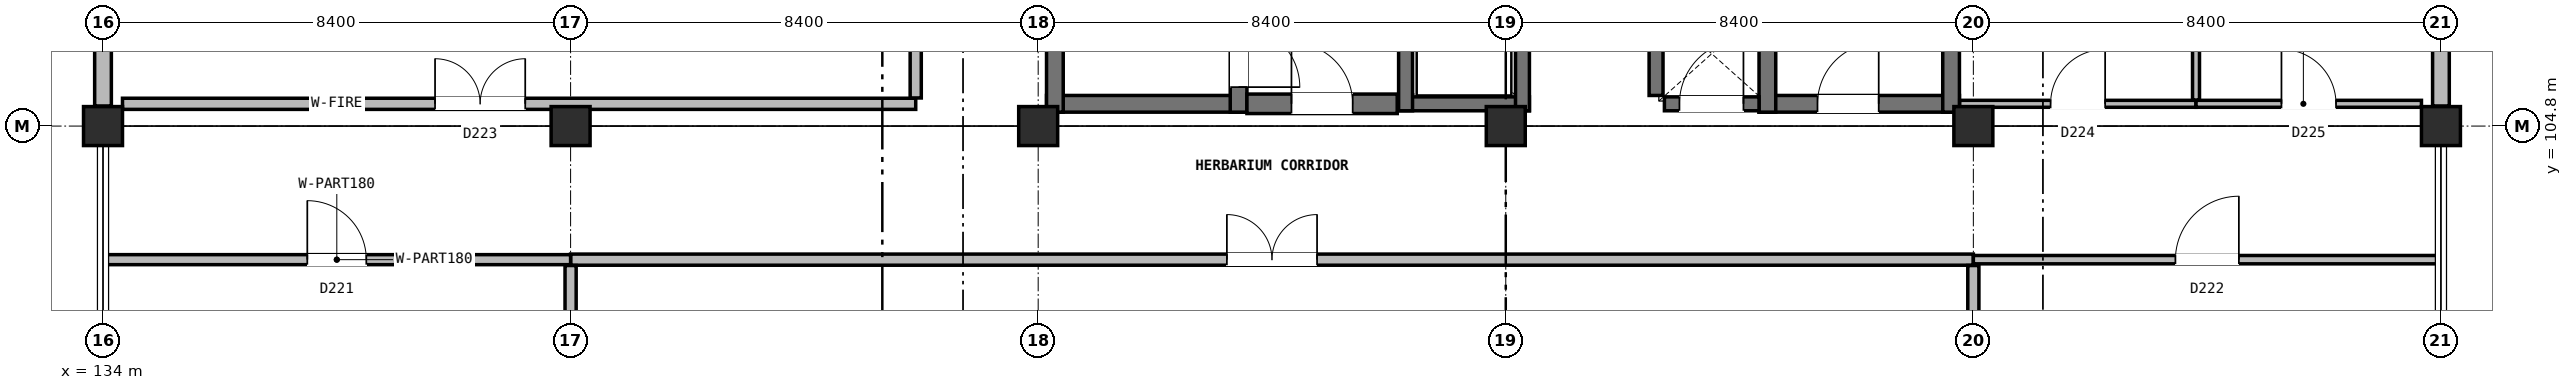
"""IFC4 building model, lengths in metres.
Left out: names, types, materials, properties, quantities, classifications, styles, units other than length and angle.
Written with IfcOpenShell. Run it as: python <this file> out.ifc"""

import sys

from ifc_helpers import new_model, si_unit, direction, frame, frame_2d, origin, origin_2d, place, context, subcontext, project, spatial, rectangle, extrude, element, fill, save


model = new_model("IFC4")
c1 = context("Model", 3, precision=1e-05, world=origin(), true_north=direction((0.0, 1.0)))
c2 = subcontext(c1, "Body", "Model", "MODEL_VIEW")
j1 = project(units=[si_unit("LENGTHUNIT", "METRE"), si_unit("PLANEANGLEUNIT", "RADIAN")], contexts=[c1])
p1 = place(None, origin())
s1 = spatial("IfcSite", under=j1, at=p1, CompositionType="ELEMENT")
p2 = place(p1, origin())
s2 = spatial("IfcBuilding", under=s1, at=p2, CompositionType="ELEMENT")
p3 = place(p2, frame((0.0, 0.0, 28.8)))
s3 = spatial("IfcBuildingStorey", under=s2, at=p3, CompositionType="ELEMENT", Elevation=28.8)
for number, where, z_axis, x_axis in (
    (1, (134.0, 104.8, 0.0), (0.0, 0.0, 1.0), (1.0, 0.0, 0.0)),
    (2, (142.4, 104.8, 0.0), (0.0, 0.0, 1.0), (1.0, 0.0, 0.0)),
    (3, (150.8, 104.8, 0.0), (0.0, 0.0, 1.0), (1.0, 0.0, 0.0)),
    (4, (159.2, 104.8, 0.0), (0.0, 0.0, 1.0), (1.0, 0.0, 0.0)),
    (5, (167.6, 104.8, 0.0), (0.0, 0.0, 1.0), (1.0, 0.0, 0.0)),
    (6, (176.0, 104.8, 0.0), (0.0, 0.0, 1.0), (1.0, 0.0, 0.0)),
):
    element("IfcColumn", number, at=place(p3, frame(where, z_axis=z_axis, x_axis=x_axis)), inside=s3, PredefinedType="COLUMN", context=c2, shape_type="SweptSolid", body=[
        extrude(rectangle(XDim=0.7, YDim=0.7, at=origin_2d()), origin(), (0.0, 0.0, 1.0), 4.0),
    ])
p4 = place(p3, frame((176.0, 105.16, 0.0), z_axis=(0.0, 0.0, 1.0), x_axis=(0.0, 1.0, 0.0)))
e7 = element("IfcWall", 7, at=p4, inside=s3, PredefinedType="SOLIDWALL", context=c2, shape_type="SweptSolid", body=[
    extrude(rectangle(XDim=8.08, YDim=0.3, at=frame_2d((4.04, 0.0))), origin(), (0.0, 0.0, 1.0), 3.15),
])
p5 = place(p4, frame((2.46, 0.0, 0.9)))
e8 = element("IfcOpeningElement", 8, at=p5, cuts=e7, PredefinedType="OPENING", context=c2, shape_type="SweptSolid", body=[
    extrude(rectangle(XDim=3.2, YDim=2.1, at=frame_2d((1.6, 1.05))), frame((0.0, 0.16, 0.0), z_axis=(0.0, -1.0, 0.0), x_axis=(1.0, 0.0, 0.0)), (0.0, 0.0, 1.0), 0.32),
])
p6 = place(p3, frame((134.0, 113.24, 0.0), z_axis=(0.0, 0.0, 1.0), x_axis=(0.0, -1.0, 0.0)))
e9 = element("IfcWall", 9, at=p6, inside=s3, PredefinedType="SOLIDWALL", context=c2, shape_type="SweptSolid", body=[
    extrude(rectangle(XDim=8.08, YDim=0.3, at=frame_2d((4.04, 0.0))), origin(), (0.0, 0.0, 1.0), 3.15),
])
p7 = place(p6, frame((3.27, 0.0, 0.9)))
e10 = element("IfcOpeningElement", 10, at=p7, cuts=e9, PredefinedType="OPENING", context=c2, shape_type="SweptSolid", body=[
    extrude(rectangle(XDim=1.5, YDim=1.8, at=frame_2d((0.75, 0.9))), frame((0.0, 0.16, 0.0), z_axis=(0.0, -1.0, 0.0), x_axis=(1.0, 0.0, 0.0)), (0.0, 0.0, 1.0), 0.32),
])
p8 = place(p3, frame((150.95, 105.2, 0.0), z_axis=(0.0, 0.0, 1.0), x_axis=(1.0, 0.0, 0.0)))
e11 = element("IfcWall", 11, at=p8, inside=s3, PredefinedType="SHEAR", context=c2, shape_type="SweptSolid", body=[
    extrude(rectangle(XDim=3.6, YDim=0.3, at=frame_2d((1.8, 0.0))), origin(), (0.0, 0.0, 1.0), 4.0),
])
p9 = place(p3, frame((151.1, 105.05, 0.0), z_axis=(0.0, 0.0, 1.0), x_axis=(0.0, 1.0, 0.0)))
e12 = element("IfcWall", 12, at=p9, inside=s3, PredefinedType="SHEAR", context=c2, shape_type="SweptSolid", body=[
    extrude(rectangle(XDim=8.3, YDim=0.3, at=frame_2d((4.15, 0.0))), origin(), (0.0, 0.0, 1.0), 4.0),
])
p10 = place(p3, frame((154.4, 105.05, 0.0), z_axis=(0.0, 0.0, 1.0), x_axis=(0.0, 1.0, 0.0)))
e13 = element("IfcWall", 13, at=p10, inside=s3, PredefinedType="SHEAR", context=c2, shape_type="SweptSolid", body=[
    extrude(rectangle(XDim=8.3, YDim=0.3, at=frame_2d((4.15, 0.0))), origin(), (0.0, 0.0, 1.0), 4.0),
])
p11 = place(p10, frame((0.45, 0.0, 0.0)))
e14 = element("IfcOpeningElement", 14, at=p11, cuts=e13, PredefinedType="OPENING", context=c2, shape_type="SweptSolid", body=[
    extrude(rectangle(XDim=1.1, YDim=2.2, at=frame_2d((0.55, 1.1))), frame((0.0, 0.16, 0.0), z_axis=(0.0, -1.0, 0.0), x_axis=(1.0, 0.0, 0.0)), (0.0, 0.0, 1.0), 0.32),
])
p12 = place(p3, frame((163.75, 105.2, 0.0), z_axis=(0.0, 0.0, 1.0), x_axis=(1.0, 0.0, 0.0)))
e15 = element("IfcWall", 15, at=p12, inside=s3, PredefinedType="SHEAR", context=c2, shape_type="SweptSolid", body=[
    extrude(rectangle(XDim=3.6, YDim=0.3, at=frame_2d((1.8, 0.0))), origin(), (0.0, 0.0, 1.0), 4.0),
])
p13 = place(p12, frame((1.05, 0.0, 0.0)))
e16 = element("IfcOpeningElement", 16, at=p13, cuts=e15, PredefinedType="OPENING", context=c2, shape_type="SweptSolid", body=[
    extrude(rectangle(XDim=1.1, YDim=2.2, at=frame_2d((0.55, 1.1))), frame((0.0, 0.16, 0.0), z_axis=(0.0, -1.0, 0.0), x_axis=(1.0, 0.0, 0.0)), (0.0, 0.0, 1.0), 0.32),
])
for number, where, z_axis, x_axis in (
    (17, (163.9, 105.05, 0.0), (0.0, 0.0, 1.0), (0.0, 1.0, 0.0)),
    (18, (167.2, 105.05, 0.0), (0.0, 0.0, 1.0), (0.0, 1.0, 0.0)),
):
    element("IfcWall", number, at=place(p3, frame(where, z_axis=z_axis, x_axis=x_axis)), inside=s3, PredefinedType="SHEAR", context=c2, shape_type="SweptSolid", body=[
        extrude(rectangle(XDim=8.3, YDim=0.3, at=frame_2d((4.15, 0.0))), origin(), (0.0, 0.0, 1.0), 4.0),
    ])
p14 = place(p3, frame((157.275, 105.2, 0.0), z_axis=(0.0, 0.0, 1.0), x_axis=(1.0, 0.0, 0.0)))
e19 = element("IfcWall", 19, at=p14, inside=s3, PredefinedType="SOLIDWALL", context=c2, shape_type="SweptSolid", body=[
    extrude(rectangle(XDim=2.35, YDim=0.25, at=frame_2d((1.175, 0.0))), origin(), (0.0, 0.0, 1.0), 3.68),
])
for number, where, z_axis, x_axis in (
    (20, (157.4, 105.075, 0.0), (0.0, 0.0, 1.0), (0.0, 1.0, 0.0)),
    (21, (159.5, 105.075, 0.0), (0.0, 0.0, 1.0), (0.0, 1.0, 0.0)),
):
    element("IfcWall", number, at=place(p3, frame(where, z_axis=z_axis, x_axis=x_axis)), inside=s3, PredefinedType="SOLIDWALL", context=c2, shape_type="SweptSolid", body=[
        extrude(rectangle(XDim=2.65, YDim=0.25, at=frame_2d((1.325, 0.0))), origin(), (0.0, 0.0, 1.0), 3.68),
    ])
p15 = place(p3, frame((154.55, 105.2, 0.0), z_axis=(0.0, 0.0, 1.0), x_axis=(1.0, 0.0, 0.0)))
e22 = element("IfcWall", 22, at=p15, inside=s3, PredefinedType="SHEAR", context=c2, shape_type="SweptSolid", body=[
    extrude(rectangle(XDim=2.7, YDim=0.35, at=frame_2d((1.35, 0.0))), origin(), (0.0, 0.0, 1.0), 3.68),
])
p16 = place(p15, frame((0.8, 0.0, 0.0)))
e23 = element("IfcOpeningElement", 23, at=p16, cuts=e22, PredefinedType="OPENING", context=c2, shape_type="SweptSolid", body=[
    extrude(rectangle(XDim=1.1, YDim=2.2, at=frame_2d((0.55, 1.1))), frame((0.0, 0.185, 0.0), z_axis=(0.0, -1.0, 0.0), x_axis=(1.0, 0.0, 0.0)), (0.0, 0.0, 1.0), 0.37),
])
p17 = place(p3, frame((161.9, 105.35, 0.0), z_axis=(0.0, 0.0, 1.0), x_axis=(0.0, 1.0, 0.0)))
e24 = element("IfcWall", 24, at=p17, inside=s3, PredefinedType="SOLIDWALL", context=c2, shape_type="SweptSolid", body=[
    extrude(rectangle(XDim=1.5, YDim=0.25, at=frame_2d((0.75, 0.0))), origin(), (0.0, 0.0, 1.0), 3.68),
])
p18 = place(p3, frame((162.05, 105.2, 0.0), z_axis=(0.0, 0.0, 1.0), x_axis=(1.0, 0.0, 0.0)))
e25 = element("IfcWall", 25, at=p18, inside=s3, PredefinedType="SOLIDWALL", context=c2, shape_type="SweptSolid", body=[
    extrude(rectangle(XDim=1.7, YDim=0.25, at=frame_2d((0.85, 0.0))), origin(), (0.0, 0.0, 1.0), 3.68),
])
p19 = place(p18, frame((0.27, 0.0, 0.0)))
e26 = element("IfcOpeningElement", 26, at=p19, cuts=e25, PredefinedType="OPENING", context=c2, shape_type="SweptSolid", body=[
    extrude(rectangle(XDim=1.15, YDim=2.2, at=frame_2d((0.575, 1.1))), frame((0.0, 0.135, 0.0), z_axis=(0.0, -1.0, 0.0), x_axis=(1.0, 0.0, 0.0)), (0.0, 0.0, 1.0), 0.27),
])
p20 = place(p3, frame((142.4, 102.4, 0.0), z_axis=(0.0, 0.0, 1.0), x_axis=(1.0, 0.0, 0.0)))
e27 = element("IfcWall", 27, at=p20, inside=s3, PredefinedType="PARTITIONING", context=c2, shape_type="SweptSolid", body=[
    extrude(rectangle(XDim=25.2, YDim=0.2, at=frame_2d((12.6, 0.0))), origin(), (0.0, 0.0, 1.0), 3.665),
])
p21 = place(p20, frame((11.79, 0.0, 0.0)))
e28 = element("IfcOpeningElement", 28, at=p21, cuts=e27, PredefinedType="OPENING", context=c2, shape_type="SweptSolid", body=[
    extrude(rectangle(XDim=1.62, YDim=2.25, at=frame_2d((0.81, 1.125))), frame((0.0, 0.11, 0.0), z_axis=(0.0, -1.0, 0.0), x_axis=(1.0, 0.0, 0.0)), (0.0, 0.0, 1.0), 0.22),
])
p22 = place(p3, frame((134.0, 102.4, 0.0), z_axis=(0.0, 0.0, 1.0), x_axis=(1.0, 0.0, 0.0)))
e29 = element("IfcWall", 29, at=p22, inside=s3, PredefinedType="PARTITIONING", context=c2, shape_type="SweptSolid", body=[
    extrude(rectangle(XDim=8.4, YDim=0.18, at=frame_2d((4.2, 0.0))), origin(), (0.0, 0.0, 1.0), 3.665),
])
p23 = place(p22, frame((3.67, 0.0, 0.0)))
e30 = element("IfcOpeningElement", 30, at=p23, cuts=e29, PredefinedType="OPENING", context=c2, shape_type="SweptSolid", body=[
    extrude(rectangle(XDim=1.06, YDim=2.22, at=frame_2d((0.53, 1.11))), frame((0.0, 0.1, 0.0), z_axis=(0.0, -1.0, 0.0), x_axis=(1.0, 0.0, 0.0)), (0.0, 0.0, 1.0), 0.2),
])
p24 = place(p3, frame((167.6, 102.4, 0.0), z_axis=(0.0, 0.0, 1.0), x_axis=(1.0, 0.0, 0.0)))
e31 = element("IfcWall", 31, at=p24, inside=s3, PredefinedType="PARTITIONING", context=c2, shape_type="SweptSolid", body=[
    extrude(rectangle(XDim=8.4, YDim=0.15, at=frame_2d((4.2, 0.0))), origin(), (0.0, 0.0, 1.0), 3.665),
])
p25 = place(p24, frame((3.63, 0.0, 0.0)))
e32 = element("IfcOpeningElement", 32, at=p25, cuts=e31, PredefinedType="OPENING", context=c2, shape_type="SweptSolid", body=[
    extrude(rectangle(XDim=1.14, YDim=2.24, at=frame_2d((0.57, 1.12))), frame((0.0, 0.085, 0.0), z_axis=(0.0, -1.0, 0.0), x_axis=(1.0, 0.0, 0.0)), (0.0, 0.0, 1.0), 0.17),
])
p26 = place(p3, frame((134.35, 105.2, 0.0), z_axis=(0.0, 0.0, 1.0), x_axis=(1.0, 0.0, 0.0)))
e33 = element("IfcWall", 33, at=p26, inside=s3, PredefinedType="PARTITIONING", context=c2, shape_type="SweptSolid", body=[
    extrude(rectangle(XDim=14.25, YDim=0.2, at=frame_2d((7.125, 0.0))), origin(), (0.0, 0.0, 1.0), 3.145),
])
p27 = place(p26, frame((5.615, 0.0, 0.0)))
e34 = element("IfcOpeningElement", 34, at=p27, cuts=e33, PredefinedType="OPENING", context=c2, shape_type="SweptSolid", body=[
    extrude(rectangle(XDim=1.62, YDim=2.25, at=frame_2d((0.81, 1.125))), frame((0.0, 0.11, 0.0), z_axis=(0.0, -1.0, 0.0), x_axis=(1.0, 0.0, 0.0)), (0.0, 0.0, 1.0), 0.22),
])
p28 = place(p3, frame((167.355, 105.2, 0.0), z_axis=(0.0, 0.0, 1.0), x_axis=(1.0, 0.0, 0.0)))
e35 = element("IfcWall", 35, at=p28, inside=s3, PredefinedType="PARTITIONING", context=c2, shape_type="SweptSolid", body=[
    extrude(rectangle(XDim=4.245, YDim=0.125, at=frame_2d((2.123, 0.0))), origin(), (0.0, 0.0, 1.0), 3.145),
])
p29 = place(p28, frame((1.633, 0.0, 0.0)))
e36 = element("IfcOpeningElement", 36, at=p29, cuts=e35, PredefinedType="OPENING", context=c2, shape_type="SweptSolid", body=[
    extrude(rectangle(XDim=0.98, YDim=2.1, at=frame_2d((0.49, 1.05))), frame((0.0, 0.073, 0.0), z_axis=(0.0, -1.0, 0.0), x_axis=(1.0, 0.0, 0.0)), (0.0, 0.0, 1.0), 0.145),
])
p30 = place(p3, frame((171.6, 105.2, 0.0), z_axis=(0.0, 0.0, 1.0), x_axis=(1.0, 0.0, 0.0)))
e37 = element("IfcWall", 37, at=p30, inside=s3, PredefinedType="PARTITIONING", context=c2, shape_type="SweptSolid", body=[
    extrude(rectangle(XDim=4.05, YDim=0.125, at=frame_2d((2.025, 0.0))), origin(), (0.0, 0.0, 1.0), 3.145),
])
p31 = place(p30, frame((1.535, 0.0, 0.0)))
e38 = element("IfcOpeningElement", 38, at=p31, cuts=e37, PredefinedType="OPENING", context=c2, shape_type="SweptSolid", body=[
    extrude(rectangle(XDim=0.98, YDim=2.1, at=frame_2d((0.49, 1.05))), frame((0.0, 0.073, 0.0), z_axis=(0.0, -1.0, 0.0), x_axis=(1.0, 0.0, 0.0)), (0.0, 0.0, 1.0), 0.145),
])
p32 = place(p3, frame((148.6, 105.305, 0.0), z_axis=(0.0, 0.0, 1.0), x_axis=(0.0, 1.0, 0.0)))
e39 = element("IfcWall", 39, at=p32, inside=s3, PredefinedType="PARTITIONING", context=c2, shape_type="SweptSolid", body=[
    extrude(rectangle(XDim=14.095, YDim=0.2, at=frame_2d((7.047, 0.0))), origin(), (0.0, 0.0, 1.0), 3.665),
])
for number, where, z_axis, x_axis in (
    (40, (142.4, 87.55, 0.0), (0.0, 0.0, 1.0), (0.0, 1.0, 0.0)),
    (41, (167.6, 87.55, 0.0), (0.0, 0.0, 1.0), (0.0, 1.0, 0.0)),
):
    element("IfcWall", number, at=place(p3, frame(where, z_axis=z_axis, x_axis=x_axis)), inside=s3, PredefinedType="PARTITIONING", context=c2, shape_type="SweptSolid", body=[
        extrude(rectangle(XDim=14.745, YDim=0.2, at=frame_2d((7.373, 0.0))), origin(), (0.0, 0.0, 1.0), 3.145),
    ])
p33 = place(p3, frame((171.6, 105.268, 0.0), z_axis=(0.0, 0.0, 1.0), x_axis=(0.0, 1.0, 0.0)))
e42 = element("IfcWall", 42, at=p33, inside=s3, PredefinedType="PARTITIONING", context=c2, shape_type="SweptSolid", body=[
    extrude(rectangle(XDim=16.978, YDim=0.125, at=frame_2d((8.489, 0.0))), origin(), (0.0, 0.0, 1.0), 3.665),
])
p34 = place(p11, frame((1.1, 0.0, 0.0), z_axis=(0.0, 0.0, 1.0), x_axis=(-1.0, 0.0, 0.0)))
e43 = element("IfcDoor", 43, at=p34, inside=s3, OperationType="SINGLE_SWING_LEFT", PredefinedType="DOOR", context=c2, shape_type="SweptSolid", body=[
    extrude(rectangle(XDim=1.1, YDim=2.2, at=frame_2d((0.55, 1.1))), frame((0.0, 0.025, 0.0), z_axis=(0.0, -1.0, 0.0), x_axis=(1.0, 0.0, 0.0)), (0.0, 0.0, 1.0), 0.05),
])
fill(e14, e43)
p35 = place(p13, origin())
e44 = element("IfcDoor", 44, at=p35, inside=s3, OperationType="SINGLE_SWING_RIGHT", PredefinedType="DOOR", context=c2, shape_type="SweptSolid", body=[
    extrude(rectangle(XDim=1.1, YDim=2.2, at=frame_2d((0.55, 1.1))), frame((0.0, 0.025, 0.0), z_axis=(0.0, -1.0, 0.0), x_axis=(1.0, 0.0, 0.0)), (0.0, 0.0, 1.0), 0.05),
])
fill(e16, e44)
p36 = place(p16, origin())
e45 = element("IfcDoor", 45, at=p36, inside=s3, OperationType="SINGLE_SWING_LEFT", PredefinedType="DOOR", context=c2, shape_type="SweptSolid", body=[
    extrude(rectangle(XDim=1.1, YDim=2.2, at=frame_2d((0.55, 1.1))), frame((0.0, 0.025, 0.0), z_axis=(0.0, -1.0, 0.0), x_axis=(1.0, 0.0, 0.0)), (0.0, 0.0, 1.0), 0.05),
])
fill(e23, e45)
p37 = place(p19, origin())
e46 = element("IfcDoor", 46, at=p37, inside=s3, OperationType="SINGLE_SWING_RIGHT", PredefinedType="DOOR", context=c2, shape_type="SweptSolid", body=[
    extrude(rectangle(XDim=1.15, YDim=2.2, at=frame_2d((0.575, 1.1))), frame((0.0, 0.025, 0.0), z_axis=(0.0, -1.0, 0.0), x_axis=(1.0, 0.0, 0.0)), (0.0, 0.0, 1.0), 0.05),
])
fill(e26, e46)
p38 = place(p21, origin())
e47 = element("IfcDoor", 47, at=p38, inside=s3, OperationType="DOUBLE_DOOR_SINGLE_SWING", PredefinedType="DOOR", context=c2, shape_type="SweptSolid", body=[
    extrude(rectangle(XDim=1.62, YDim=2.25, at=frame_2d((0.81, 1.125))), frame((0.0, 0.025, 0.0), z_axis=(0.0, -1.0, 0.0), x_axis=(1.0, 0.0, 0.0)), (0.0, 0.0, 1.0), 0.05),
])
fill(e28, e47)
p39 = place(p23, origin())
e48 = element("IfcDoor", 48, at=p39, inside=s3, OperationType="SINGLE_SWING_LEFT", PredefinedType="DOOR", context=c2, shape_type="SweptSolid", body=[
    extrude(rectangle(XDim=1.06, YDim=2.22, at=frame_2d((0.53, 1.11))), frame((0.0, 0.025, 0.0), z_axis=(0.0, -1.0, 0.0), x_axis=(1.0, 0.0, 0.0)), (0.0, 0.0, 1.0), 0.05),
])
fill(e30, e48)
p40 = place(p25, origin())
e49 = element("IfcDoor", 49, at=p40, inside=s3, OperationType="SINGLE_SWING_RIGHT", PredefinedType="DOOR", context=c2, shape_type="SweptSolid", body=[
    extrude(rectangle(XDim=1.14, YDim=2.24, at=frame_2d((0.57, 1.12))), frame((0.0, 0.025, 0.0), z_axis=(0.0, -1.0, 0.0), x_axis=(1.0, 0.0, 0.0)), (0.0, 0.0, 1.0), 0.05),
])
fill(e32, e49)
p41 = place(p27, origin())
e50 = element("IfcDoor", 50, at=p41, inside=s3, OperationType="DOUBLE_DOOR_SINGLE_SWING", PredefinedType="DOOR", context=c2, shape_type="SweptSolid", body=[
    extrude(rectangle(XDim=1.62, YDim=2.25, at=frame_2d((0.81, 1.125))), frame((0.0, 0.025, 0.0), z_axis=(0.0, -1.0, 0.0), x_axis=(1.0, 0.0, 0.0)), (0.0, 0.0, 1.0), 0.05),
])
fill(e34, e50)
p42 = place(p29, origin())
e51 = element("IfcDoor", 51, at=p42, inside=s3, OperationType="SINGLE_SWING_RIGHT", PredefinedType="DOOR", context=c2, shape_type="SweptSolid", body=[
    extrude(rectangle(XDim=0.98, YDim=2.1, at=frame_2d((0.49, 1.05))), frame((0.0, 0.025, 0.0), z_axis=(0.0, -1.0, 0.0), x_axis=(1.0, 0.0, 0.0)), (0.0, 0.0, 1.0), 0.05),
])
fill(e36, e51)
p43 = place(p31, origin())
e52 = element("IfcDoor", 52, at=p43, inside=s3, OperationType="SINGLE_SWING_LEFT", PredefinedType="DOOR", context=c2, shape_type="SweptSolid", body=[
    extrude(rectangle(XDim=0.98, YDim=2.1, at=frame_2d((0.49, 1.05))), frame((0.0, 0.025, 0.0), z_axis=(0.0, -1.0, 0.0), x_axis=(1.0, 0.0, 0.0)), (0.0, 0.0, 1.0), 0.05),
])
fill(e38, e52)
save(model, sys.argv[1])
